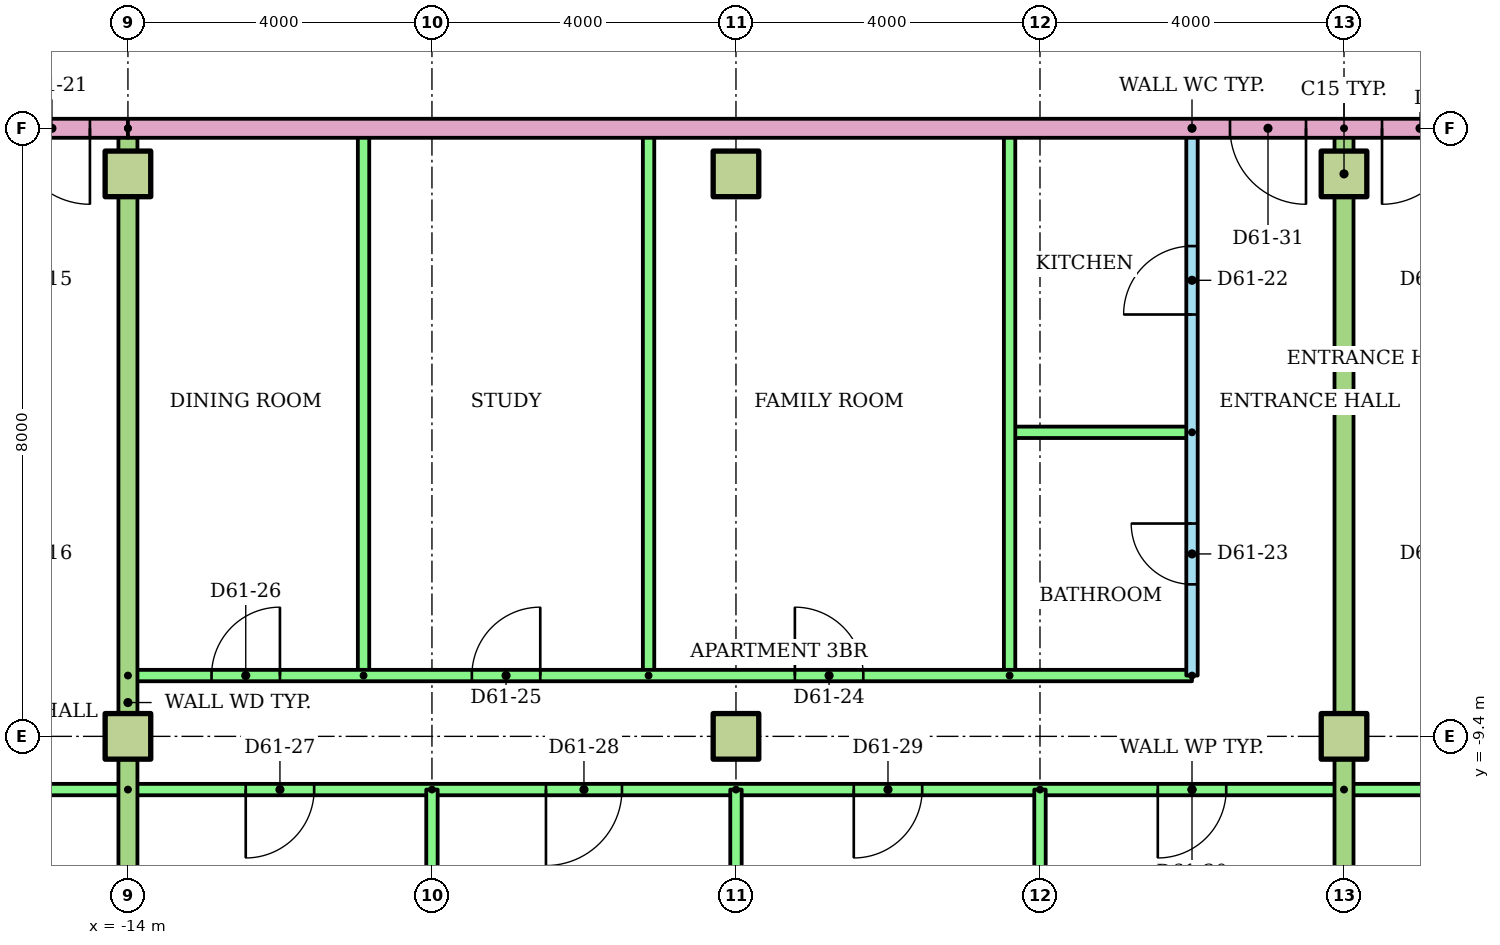
"""IFC4 building model, lengths in metres.
Left out: names, types, materials, properties, quantities, classifications, styles, units other than length and angle.
Written with IfcOpenShell. Run it as: python <this file> out.ifc"""

import sys

from ifc_helpers import new_model, si_unit, direction, frame, frame_2d, origin, origin_2d, place, context, subcontext, project, spatial, rectangle, extrude, element, fill, save


model = new_model("IFC4")
c1 = context("Model", 3, precision=1e-05, world=origin(), true_north=direction((0.0, 1.0)))
c2 = subcontext(c1, "Body", "Model", "MODEL_VIEW")
j1 = project(units=[si_unit("LENGTHUNIT", "METRE"), si_unit("PLANEANGLEUNIT", "RADIAN")], contexts=[c1])
p1 = place(None, origin())
s1 = spatial("IfcSite", under=j1, at=p1, CompositionType="ELEMENT")
p2 = place(p1, origin())
s2 = spatial("IfcBuilding", under=s1, at=p2, CompositionType="ELEMENT")
p3 = place(p2, frame((0.0, 0.0, 233.2)))
s3 = spatial("IfcBuildingStorey", under=s2, at=p3, CompositionType="ELEMENT", Elevation=233.2)
for number, where in (
    (1, (-14.0, -9.4, 0.0)),
    (2, (-6.0, -9.4, 0.0)),
    (3, (2.0, -9.4, 0.0)),
    (4, (-14.0, -2.0, 0.0)),
    (5, (-6.0, -2.0, 0.0)),
    (6, (2.0, -2.0, 0.0)),
):
    element("IfcColumn", number, at=place(p3, frame(where)), inside=s3, PredefinedType="COLUMN", context=c2, shape_type="SweptSolid", body=[
        extrude(rectangle(XDim=0.6, YDim=0.6, at=origin_2d()), origin(), (0.0, 0.0, 1.0), 3.2),
    ])
p4 = place(p3, frame((-14.0, -10.1, 0.0), z_axis=(0.0, 0.0, 1.0), x_axis=(-1.0, 0.0, 0.0)))
e7 = element("IfcWall", 7, at=p4, inside=s3, PredefinedType="PARTITIONING", context=c2, shape_type="SweptSolid", body=[
    extrude(rectangle(XDim=14.92, YDim=0.15, at=frame_2d((7.46, 0.0))), origin(), (0.0, 0.0, 1.0), 2.4),
])
p5 = place(p4, frame((12.0, 0.0, 0.0)))
e8 = element("IfcOpeningElement", 8, at=p5, cuts=e7, PredefinedType="OPENING", context=c2, shape_type="SweptSolid", body=[
    extrude(rectangle(XDim=0.9, YDim=2.1, at=frame_2d((0.45, 1.05))), frame((0.0, 0.085, 0.0), z_axis=(0.0, -1.0, 0.0), x_axis=(1.0, 0.0, 0.0)), (0.0, 0.0, 1.0), 0.17),
])
p6 = place(p4, frame((4.6, 0.0, 0.0)))
e9 = element("IfcOpeningElement", 9, at=p6, cuts=e7, PredefinedType="OPENING", context=c2, shape_type="SweptSolid", body=[
    extrude(rectangle(XDim=1.0, YDim=2.1, at=frame_2d((0.5, 1.05))), frame((0.0, 0.085, 0.0), z_axis=(0.0, -1.0, 0.0), x_axis=(1.0, 0.0, 0.0)), (0.0, 0.0, 1.0), 0.17),
])
p7 = place(p3, frame((0.0, -8.6, 0.0), z_axis=(0.0, 0.0, 1.0), x_axis=(0.0, 1.0, 0.0)))
e10 = element("IfcWall", 10, at=p7, inside=s3, PredefinedType="PARTITIONING", context=c2, shape_type="SweptSolid", body=[
    extrude(rectangle(XDim=7.2, YDim=0.15, at=frame_2d((3.6, 0.0))), origin(), (0.0, 0.0, 1.0), 2.4),
])
p8 = place(p7, frame((4.75, 0.0, 0.0)))
e11 = element("IfcOpeningElement", 11, at=p8, cuts=e10, PredefinedType="OPENING", context=c2, shape_type="SweptSolid", body=[
    extrude(rectangle(XDim=0.9, YDim=2.1, at=frame_2d((0.45, 1.05))), frame((0.0, 0.085, 0.0), z_axis=(0.0, -1.0, 0.0), x_axis=(1.0, 0.0, 0.0)), (0.0, 0.0, 1.0), 0.17),
])
p9 = place(p7, frame((1.2, 0.0, 0.0)))
e12 = element("IfcOpeningElement", 12, at=p9, cuts=e10, PredefinedType="OPENING", context=c2, shape_type="SweptSolid", body=[
    extrude(rectangle(XDim=0.8, YDim=2.1, at=frame_2d((0.4, 1.05))), frame((0.0, 0.085, 0.0), z_axis=(0.0, -1.0, 0.0), x_axis=(1.0, 0.0, 0.0)), (0.0, 0.0, 1.0), 0.17),
])
p10 = place(p3, frame((0.0, -5.4, 0.0), z_axis=(0.0, 0.0, 1.0), x_axis=(-1.0, 0.0, 0.0)))
e13 = element("IfcWall", 13, at=p10, inside=s3, PredefinedType="PARTITIONING", context=c2, shape_type="SweptSolid", body=[
    extrude(rectangle(XDim=2.4, YDim=0.15, at=frame_2d((1.2, 0.0))), origin(), (0.0, 0.0, 1.0), 2.4),
])
for number, where, z_axis, x_axis in (
    (14, (-2.4, -8.6, 0.0), (0.0, 0.0, 1.0), (0.0, 1.0, 0.0)),
    (15, (-7.15, -8.6, 0.0), (0.0, 0.0, 1.0), (0.0, 1.0, 0.0)),
    (16, (-10.9, -8.6, 0.0), (0.0, 0.0, 1.0), (0.0, 1.0, 0.0)),
):
    element("IfcWall", number, at=place(p3, frame(where, z_axis=z_axis, x_axis=x_axis)), inside=s3, PredefinedType="PARTITIONING", context=c2, shape_type="SweptSolid", body=[
        extrude(rectangle(XDim=7.2, YDim=0.15, at=frame_2d((3.6, 0.0))), origin(), (0.0, 0.0, 1.0), 2.4),
    ])
p11 = place(p3, frame((-14.0, -8.6, 0.0)))
e17 = element("IfcWall", 17, at=p11, inside=s3, PredefinedType="PARTITIONING", context=c2, shape_type="SweptSolid", body=[
    extrude(rectangle(XDim=14.0, YDim=0.15, at=frame_2d((7.0, 0.0))), origin(), (0.0, 0.0, 1.0), 2.4),
])
p12 = place(p11, frame((8.775, 0.0, 0.0)))
e18 = element("IfcOpeningElement", 18, at=p12, cuts=e17, PredefinedType="OPENING", context=c2, shape_type="SweptSolid", body=[
    extrude(rectangle(XDim=0.9, YDim=2.1, at=frame_2d((0.45, 1.05))), frame((0.0, 0.085, 0.0), z_axis=(0.0, -1.0, 0.0), x_axis=(1.0, 0.0, 0.0)), (0.0, 0.0, 1.0), 0.17),
])
p13 = place(p11, frame((4.525, 0.0, 0.0)))
e19 = element("IfcOpeningElement", 19, at=p13, cuts=e17, PredefinedType="OPENING", context=c2, shape_type="SweptSolid", body=[
    extrude(rectangle(XDim=0.9, YDim=2.1, at=frame_2d((0.45, 1.05))), frame((0.0, 0.085, 0.0), z_axis=(0.0, -1.0, 0.0), x_axis=(1.0, 0.0, 0.0)), (0.0, 0.0, 1.0), 0.17),
])
p14 = place(p11, frame((1.1, 0.0, 0.0)))
e20 = element("IfcOpeningElement", 20, at=p14, cuts=e17, PredefinedType="OPENING", context=c2, shape_type="SweptSolid", body=[
    extrude(rectangle(XDim=0.9, YDim=2.1, at=frame_2d((0.45, 1.05))), frame((0.0, 0.085, 0.0), z_axis=(0.0, -1.0, 0.0), x_axis=(1.0, 0.0, 0.0)), (0.0, 0.0, 1.0), 0.17),
])
p15 = place(p3, frame((2.0, -10.1, 0.0), z_axis=(0.0, 0.0, 1.0), x_axis=(-1.0, 0.0, 0.0)))
e21 = element("IfcWall", 21, at=p15, inside=s3, PredefinedType="PARTITIONING", context=c2, shape_type="SweptSolid", body=[
    extrude(rectangle(XDim=16.0, YDim=0.15, at=frame_2d((8.0, 0.0))), origin(), (0.0, 0.0, 1.0), 2.4),
])
p16 = place(p15, frame((13.55, 0.0, 0.0)))
e22 = element("IfcOpeningElement", 22, at=p16, cuts=e21, PredefinedType="OPENING", context=c2, shape_type="SweptSolid", body=[
    extrude(rectangle(XDim=0.9, YDim=2.1, at=frame_2d((0.45, 1.05))), frame((0.0, 0.085, 0.0), z_axis=(0.0, -1.0, 0.0), x_axis=(1.0, 0.0, 0.0)), (0.0, 0.0, 1.0), 0.17),
])
p17 = place(p15, frame((9.5, 0.0, 0.0)))
e23 = element("IfcOpeningElement", 23, at=p17, cuts=e21, PredefinedType="OPENING", context=c2, shape_type="SweptSolid", body=[
    extrude(rectangle(XDim=1.0, YDim=2.1, at=frame_2d((0.5, 1.05))), frame((0.0, 0.085, 0.0), z_axis=(0.0, -1.0, 0.0), x_axis=(1.0, 0.0, 0.0)), (0.0, 0.0, 1.0), 0.17),
])
p18 = place(p15, frame((5.55, 0.0, 0.0)))
e24 = element("IfcOpeningElement", 24, at=p18, cuts=e21, PredefinedType="OPENING", context=c2, shape_type="SweptSolid", body=[
    extrude(rectangle(XDim=0.9, YDim=2.1, at=frame_2d((0.45, 1.05))), frame((0.0, 0.085, 0.0), z_axis=(0.0, -1.0, 0.0), x_axis=(1.0, 0.0, 0.0)), (0.0, 0.0, 1.0), 0.17),
])
p19 = place(p15, frame((1.55, 0.0, 0.0)))
e25 = element("IfcOpeningElement", 25, at=p19, cuts=e21, PredefinedType="OPENING", context=c2, shape_type="SweptSolid", body=[
    extrude(rectangle(XDim=0.9, YDim=2.1, at=frame_2d((0.45, 1.05))), frame((0.0, 0.085, 0.0), z_axis=(0.0, -1.0, 0.0), x_axis=(1.0, 0.0, 0.0)), (0.0, 0.0, 1.0), 0.17),
])
p20 = place(p3, frame((-10.0, -10.1, 0.0), z_axis=(0.0, 0.0, 1.0), x_axis=(0.0, -1.0, 0.0)))
e26 = element("IfcWall", 26, at=p20, inside=s3, PredefinedType="PARTITIONING", context=c2, shape_type="SweptSolid", body=[
    extrude(rectangle(XDim=6.421, YDim=0.15, at=frame_2d((3.21, 0.0))), origin(), (0.0, 0.0, 1.0), 2.4),
])
p21 = place(p3, frame((-6.0, -10.1, 0.0), z_axis=(0.0, 0.0, 1.0), x_axis=(0.0, -1.0, 0.0)))
e27 = element("IfcWall", 27, at=p21, inside=s3, PredefinedType="PARTITIONING", context=c2, shape_type="SweptSolid", body=[
    extrude(rectangle(XDim=6.41, YDim=0.15, at=frame_2d((3.205, 0.0))), origin(), (0.0, 0.0, 1.0), 2.4),
])
p22 = place(p3, frame((-2.0, -10.1, 0.0), z_axis=(0.0, 0.0, 1.0), x_axis=(0.0, -1.0, 0.0)))
e28 = element("IfcWall", 28, at=p22, inside=s3, PredefinedType="PARTITIONING", context=c2, shape_type="SweptSolid", body=[
    extrude(rectangle(XDim=6.421, YDim=0.15, at=frame_2d((3.21, 0.0))), origin(), (0.0, 0.0, 1.0), 2.4),
])
p23 = place(p3, frame((-14.0, -1.4, 0.0), z_axis=(0.0, 0.0, 1.0), x_axis=(0.0, -1.0, 0.0)))
e29 = element("IfcWall", 29, at=p23, inside=s3, PredefinedType="PARTITIONING", context=c2, shape_type="SweptSolid", body=[
    extrude(rectangle(XDim=15.11, YDim=0.25, at=frame_2d((7.555, 0.0))), origin(), (0.0, 0.0, 1.0), 2.4),
])
p24 = place(p3, frame((28.92, -10.1, 0.0), z_axis=(0.0, 0.0, 1.0), x_axis=(-1.0, 0.0, 0.0)))
e30 = element("IfcWall", 30, at=p24, inside=s3, PredefinedType="PARTITIONING", context=c2, shape_type="SweptSolid", body=[
    extrude(rectangle(XDim=26.92, YDim=0.15, at=frame_2d((13.46, 0.0))), origin(), (0.0, 0.0, 1.0), 2.4),
])
p25 = place(p24, frame((22.42, 0.0, 0.0)))
e31 = element("IfcOpeningElement", 31, at=p25, cuts=e30, PredefinedType="OPENING", context=c2, shape_type="SweptSolid", body=[
    extrude(rectangle(XDim=1.0, YDim=2.1, at=frame_2d((0.5, 1.05))), frame((0.0, 0.085, 0.0), z_axis=(0.0, -1.0, 0.0), x_axis=(1.0, 0.0, 0.0)), (0.0, 0.0, 1.0), 0.17),
])
p26 = place(p24, frame((16.47, 0.0, 0.0)))
e32 = element("IfcOpeningElement", 32, at=p26, cuts=e30, PredefinedType="OPENING", context=c2, shape_type="SweptSolid", body=[
    extrude(rectangle(XDim=0.9, YDim=2.1, at=frame_2d((0.45, 1.05))), frame((0.0, 0.085, 0.0), z_axis=(0.0, -1.0, 0.0), x_axis=(1.0, 0.0, 0.0)), (0.0, 0.0, 1.0), 0.17),
])
p27 = place(p24, frame((12.47, 0.0, 0.0)))
e33 = element("IfcOpeningElement", 33, at=p27, cuts=e30, PredefinedType="OPENING", context=c2, shape_type="SweptSolid", body=[
    extrude(rectangle(XDim=0.9, YDim=2.1, at=frame_2d((0.45, 1.05))), frame((0.0, 0.085, 0.0), z_axis=(0.0, -1.0, 0.0), x_axis=(1.0, 0.0, 0.0)), (0.0, 0.0, 1.0), 0.17),
])
p28 = place(p24, frame((7.37, 0.0, 0.0)))
e34 = element("IfcOpeningElement", 34, at=p28, cuts=e30, PredefinedType="OPENING", context=c2, shape_type="SweptSolid", body=[
    extrude(rectangle(XDim=0.9, YDim=2.1, at=frame_2d((0.45, 1.05))), frame((0.0, 0.085, 0.0), z_axis=(0.0, -1.0, 0.0), x_axis=(1.0, 0.0, 0.0)), (0.0, 0.0, 1.0), 0.17),
])
p29 = place(p24, frame((1.544, 0.0, 0.0)))
e35 = element("IfcOpeningElement", 35, at=p29, cuts=e30, PredefinedType="OPENING", context=c2, shape_type="SweptSolid", body=[
    extrude(rectangle(XDim=0.9, YDim=2.1, at=frame_2d((0.45, 1.05))), frame((0.0, 0.085, 0.0), z_axis=(0.0, -1.0, 0.0), x_axis=(1.0, 0.0, 0.0)), (0.0, 0.0, 1.0), 0.17),
])
p30 = place(p3, frame((2.0, -1.4, 0.0), z_axis=(0.0, 0.0, 1.0), x_axis=(0.0, -1.0, 0.0)))
e36 = element("IfcWall", 36, at=p30, inside=s3, PredefinedType="PARTITIONING", context=c2, shape_type="SweptSolid", body=[
    extrude(rectangle(XDim=15.11, YDim=0.25, at=frame_2d((7.555, 0.0))), origin(), (0.0, 0.0, 1.0), 2.4),
])
p31 = place(p3, frame((-14.0, -1.4, 0.0), z_axis=(0.0, 0.0, 1.0), x_axis=(-1.0, 0.0, 0.0)))
e37 = element("IfcWall", 37, at=p31, inside=s3, PredefinedType="PARTITIONING", context=c2, shape_type="SweptSolid", body=[
    extrude(rectangle(XDim=14.92, YDim=0.25, at=frame_2d((7.46, 0.0))), origin(), (0.0, 0.0, 1.0), 2.4),
])
p32 = place(p31, frame((0.5, 0.0, 0.0)))
e38 = element("IfcOpeningElement", 38, at=p32, cuts=e37, PredefinedType="OPENING", context=c2, shape_type="SweptSolid", body=[
    extrude(rectangle(XDim=1.0, YDim=2.1, at=frame_2d((0.5, 1.05))), frame((0.0, 0.135, 0.0), z_axis=(0.0, -1.0, 0.0), x_axis=(1.0, 0.0, 0.0)), (0.0, 0.0, 1.0), 0.27),
])
p33 = place(p3, frame((14.0, -1.4, 0.0), z_axis=(0.0, 0.0, 1.0), x_axis=(-1.0, 0.0, 0.0)))
e39 = element("IfcWall", 39, at=p33, inside=s3, PredefinedType="PARTITIONING", context=c2, shape_type="SweptSolid", body=[
    extrude(rectangle(XDim=28.0, YDim=0.25, at=frame_2d((14.0, 0.0))), origin(), (0.0, 0.0, 1.0), 2.4),
])
p34 = place(p33, frame((12.5, 0.0, 0.0)))
e40 = element("IfcOpeningElement", 40, at=p34, cuts=e39, PredefinedType="OPENING", context=c2, shape_type="SweptSolid", body=[
    extrude(rectangle(XDim=1.0, YDim=2.1, at=frame_2d((0.5, 1.05))), frame((0.0, 0.135, 0.0), z_axis=(0.0, -1.0, 0.0), x_axis=(1.0, 0.0, 0.0)), (0.0, 0.0, 1.0), 0.27),
])
p35 = place(p33, frame((10.5, 0.0, 0.0)))
e41 = element("IfcOpeningElement", 41, at=p35, cuts=e39, PredefinedType="OPENING", context=c2, shape_type="SweptSolid", body=[
    extrude(rectangle(XDim=1.0, YDim=2.1, at=frame_2d((0.5, 1.05))), frame((0.0, 0.135, 0.0), z_axis=(0.0, -1.0, 0.0), x_axis=(1.0, 0.0, 0.0)), (0.0, 0.0, 1.0), 0.27),
])
p36 = place(p32, origin())
e42 = element("IfcDoor", 42, at=p36, inside=s3, OperationType="SINGLE_SWING_LEFT", PredefinedType="DOOR", context=c2, shape_type="SweptSolid", body=[
    extrude(rectangle(XDim=1.0, YDim=2.1, at=frame_2d((0.5, 1.05))), frame((0.0, 0.025, 0.0), z_axis=(0.0, -1.0, 0.0), x_axis=(1.0, 0.0, 0.0)), (0.0, 0.0, 1.0), 0.05),
])
fill(e38, e42)
p37 = place(p8, origin())
e43 = element("IfcDoor", 43, at=p37, inside=s3, OperationType="SINGLE_SWING_LEFT", PredefinedType="DOOR", context=c2, shape_type="SweptSolid", body=[
    extrude(rectangle(XDim=0.9, YDim=2.1, at=frame_2d((0.45, 1.05))), frame((0.0, 0.025, 0.0), z_axis=(0.0, -1.0, 0.0), x_axis=(1.0, 0.0, 0.0)), (0.0, 0.0, 1.0), 0.05),
])
fill(e11, e43)
p38 = place(p9, origin())
e44 = element("IfcDoor", 44, at=p38, inside=s3, OperationType="SINGLE_SWING_RIGHT", PredefinedType="DOOR", context=c2, shape_type="SweptSolid", body=[
    extrude(rectangle(XDim=0.8, YDim=2.1, at=frame_2d((0.4, 1.05))), frame((0.0, 0.025, 0.0), z_axis=(0.0, -1.0, 0.0), x_axis=(1.0, 0.0, 0.0)), (0.0, 0.0, 1.0), 0.05),
])
fill(e12, e44)
p39 = place(p12, origin())
e45 = element("IfcDoor", 45, at=p39, inside=s3, OperationType="SINGLE_SWING_LEFT", PredefinedType="DOOR", context=c2, shape_type="SweptSolid", body=[
    extrude(rectangle(XDim=0.9, YDim=2.1, at=frame_2d((0.45, 1.05))), frame((0.0, 0.025, 0.0), z_axis=(0.0, -1.0, 0.0), x_axis=(1.0, 0.0, 0.0)), (0.0, 0.0, 1.0), 0.05),
])
fill(e18, e45)
p40 = place(p13, origin())
e46 = element("IfcDoor", 46, at=p40, inside=s3, OperationType="SINGLE_SWING_RIGHT", PredefinedType="DOOR", context=c2, shape_type="SweptSolid", body=[
    extrude(rectangle(XDim=0.9, YDim=2.1, at=frame_2d((0.45, 1.05))), frame((0.0, 0.025, 0.0), z_axis=(0.0, -1.0, 0.0), x_axis=(1.0, 0.0, 0.0)), (0.0, 0.0, 1.0), 0.05),
])
fill(e19, e46)
p41 = place(p14, origin())
e47 = element("IfcDoor", 47, at=p41, inside=s3, OperationType="SINGLE_SWING_RIGHT", PredefinedType="DOOR", context=c2, shape_type="SweptSolid", body=[
    extrude(rectangle(XDim=0.9, YDim=2.1, at=frame_2d((0.45, 1.05))), frame((0.0, 0.025, 0.0), z_axis=(0.0, -1.0, 0.0), x_axis=(1.0, 0.0, 0.0)), (0.0, 0.0, 1.0), 0.05),
])
fill(e20, e47)
p42 = place(p16, origin())
e48 = element("IfcDoor", 48, at=p42, inside=s3, OperationType="SINGLE_SWING_RIGHT", PredefinedType="DOOR", context=c2, shape_type="SweptSolid", body=[
    extrude(rectangle(XDim=0.9, YDim=2.1, at=frame_2d((0.45, 1.05))), frame((0.0, 0.025, 0.0), z_axis=(0.0, -1.0, 0.0), x_axis=(1.0, 0.0, 0.0)), (0.0, 0.0, 1.0), 0.05),
])
fill(e22, e48)
p43 = place(p17, origin())
e49 = element("IfcDoor", 49, at=p43, inside=s3, OperationType="SINGLE_SWING_RIGHT", PredefinedType="DOOR", context=c2, shape_type="SweptSolid", body=[
    extrude(rectangle(XDim=1.0, YDim=2.1, at=frame_2d((0.5, 1.05))), frame((0.0, 0.025, 0.0), z_axis=(0.0, -1.0, 0.0), x_axis=(1.0, 0.0, 0.0)), (0.0, 0.0, 1.0), 0.05),
])
fill(e23, e49)
p44 = place(p18, origin())
e50 = element("IfcDoor", 50, at=p44, inside=s3, OperationType="SINGLE_SWING_RIGHT", PredefinedType="DOOR", context=c2, shape_type="SweptSolid", body=[
    extrude(rectangle(XDim=0.9, YDim=2.1, at=frame_2d((0.45, 1.05))), frame((0.0, 0.025, 0.0), z_axis=(0.0, -1.0, 0.0), x_axis=(1.0, 0.0, 0.0)), (0.0, 0.0, 1.0), 0.05),
])
fill(e24, e50)
p45 = place(p19, origin())
e51 = element("IfcDoor", 51, at=p45, inside=s3, OperationType="SINGLE_SWING_RIGHT", PredefinedType="DOOR", context=c2, shape_type="SweptSolid", body=[
    extrude(rectangle(XDim=0.9, YDim=2.1, at=frame_2d((0.45, 1.05))), frame((0.0, 0.025, 0.0), z_axis=(0.0, -1.0, 0.0), x_axis=(1.0, 0.0, 0.0)), (0.0, 0.0, 1.0), 0.05),
])
fill(e25, e51)
p46 = place(p34, origin())
e52 = element("IfcDoor", 52, at=p46, inside=s3, OperationType="SINGLE_SWING_LEFT", PredefinedType="DOOR", context=c2, shape_type="SweptSolid", body=[
    extrude(rectangle(XDim=1.0, YDim=2.1, at=frame_2d((0.5, 1.05))), frame((0.0, 0.025, 0.0), z_axis=(0.0, -1.0, 0.0), x_axis=(1.0, 0.0, 0.0)), (0.0, 0.0, 1.0), 0.05),
])
fill(e40, e52)
p47 = place(p35, origin())
e53 = element("IfcDoor", 53, at=p47, inside=s3, OperationType="SINGLE_SWING_RIGHT", PredefinedType="DOOR", context=c2, shape_type="SweptSolid", body=[
    extrude(rectangle(XDim=1.0, YDim=2.1, at=frame_2d((0.5, 1.05))), frame((0.0, 0.025, 0.0), z_axis=(0.0, -1.0, 0.0), x_axis=(1.0, 0.0, 0.0)), (0.0, 0.0, 1.0), 0.05),
])
fill(e41, e53)
save(model, sys.argv[1])
